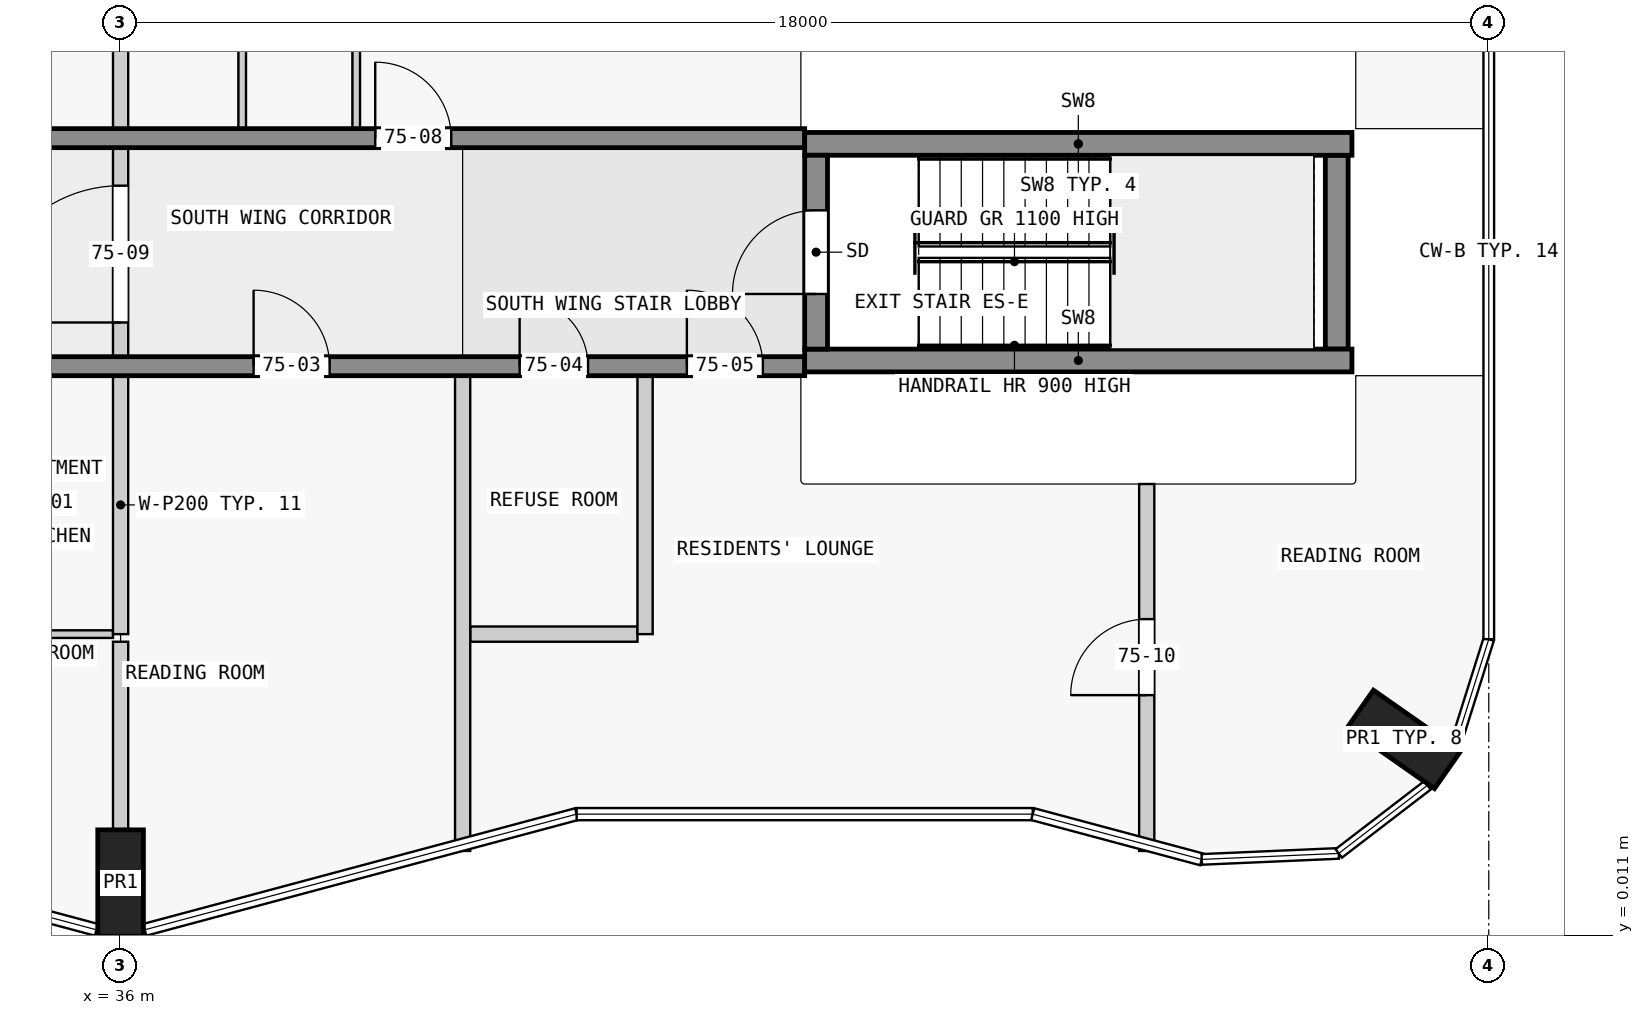
"""IFC4 building model, lengths in metres.
Left out: names, types, materials, properties, quantities, classifications, styles, units other than length and angle.
Written with IfcOpenShell. Run it as: python <this file> out.ifc"""

import sys

from ifc_helpers import new_model, si_unit, direction, frame, frame_2d, origin, origin_2d, place, context, subcontext, project, spatial, rectangle, extrude, element, fill, save


model = new_model("IFC4")
c1 = context("Model", 3, precision=1e-05, world=origin(), true_north=direction((0.0, 1.0)))
c2 = subcontext(c1, "Body", "Model", "MODEL_VIEW")
j1 = project(units=[si_unit("LENGTHUNIT", "METRE"), si_unit("PLANEANGLEUNIT", "RADIAN")], contexts=[c1])
p1 = place(None, origin())
s1 = spatial("IfcSite", under=j1, at=p1, CompositionType="ELEMENT")
p2 = place(p1, origin())
s2 = spatial("IfcBuilding", under=s1, at=p2, CompositionType="ELEMENT")
p3 = place(p2, frame((0.0, 0.0, 284.4)))
s3 = spatial("IfcBuildingStorey", under=s2, at=p3, CompositionType="ELEMENT", Elevation=284.4)
for number, where, z_axis, x_axis in (
    (1, (36.0, 0.7, 0.0), (0.0, 0.0, 1.0), (1.0, 0.0, 0.0)),
    (2, (52.884, 2.59, 0.0), (0.0, 0.0, 1.0), (0.574, 0.819, 0.0)),
):
    element("IfcColumn", number, at=place(p3, frame(where, z_axis=z_axis, x_axis=x_axis)), inside=s3, PredefinedType="COLUMN", context=c2, shape_type="SweptSolid", body=[
        extrude(rectangle(XDim=0.6, YDim=1.4, at=origin_2d()), origin(), (0.0, 0.0, 1.0), 3.5),
    ])
p4 = place(p3, frame((45.15, 7.725, 0.0), z_axis=(0.0, 0.0, 1.0), x_axis=(0.0, 1.0, 0.0)))
e3 = element("IfcWall", 3, at=p4, inside=s3, PredefinedType="SHEAR", context=c2, shape_type="SweptSolid", body=[
    extrude(rectangle(XDim=2.55, YDim=0.3, at=frame_2d((1.275, 0.0))), origin(), (0.0, 0.0, 1.0), 3.5),
])
p5 = place(p4, frame((0.725, 0.0, 0.0)))
e4 = element("IfcOpeningElement", 4, at=p5, cuts=e3, PredefinedType="OPENING", context=c2, shape_type="SweptSolid", body=[
    extrude(rectangle(XDim=1.1, YDim=2.1, at=frame_2d((0.55, 1.05))), frame((0.0, 0.16, 0.0), z_axis=(0.0, -1.0, 0.0), x_axis=(1.0, 0.0, 0.0)), (0.0, 0.0, 1.0), 0.32),
])
p6 = place(p3, frame((52.0, 7.725, 0.0), z_axis=(0.0, 0.0, 1.0), x_axis=(0.0, 1.0, 0.0)))
e5 = element("IfcWall", 5, at=p6, inside=s3, PredefinedType="SHEAR", context=c2, shape_type="SweptSolid", body=[
    extrude(rectangle(XDim=2.55, YDim=0.3, at=frame_2d((1.275, 0.0))), origin(), (0.0, 0.0, 1.0), 3.5),
])
for number, where, z_axis, x_axis in (
    (6, (45.0, 7.575, 0.0), (0.0, 0.0, 1.0), (1.0, 0.0, 0.0)),
    (7, (45.0, 10.425, 0.0), (0.0, 0.0, 1.0), (1.0, 0.0, 0.0)),
):
    element("IfcWall", number, at=place(p3, frame(where, z_axis=z_axis, x_axis=x_axis)), inside=s3, PredefinedType="SHEAR", context=c2, shape_type="SweptSolid", body=[
        extrude(rectangle(XDim=7.2, YDim=0.3, at=frame_2d((3.6, 0.0))), origin(), (0.0, 0.0, 1.0), 3.5),
    ])
p7 = place(p3, frame((22.5, 7.5, 0.0), z_axis=(0.0, 0.0, 1.0), x_axis=(1.0, 0.0, 0.0)))
e8 = element("IfcWall", 8, at=p7, inside=s3, PredefinedType="SHEAR", context=c2, shape_type="SweptSolid", body=[
    extrude(rectangle(XDim=22.5, YDim=0.25, at=frame_2d((11.25, 0.0))), origin(), (0.0, 0.0, 1.0), 3.05),
])
p8 = place(p7, frame((1.75, 0.0, 0.0)))
e9 = element("IfcOpeningElement", 9, at=p8, cuts=e8, PredefinedType="OPENING", context=c2, shape_type="SweptSolid", body=[
    extrude(rectangle(XDim=1.0, YDim=2.1, at=frame_2d((0.5, 1.05))), frame((0.0, 0.135, 0.0), z_axis=(0.0, -1.0, 0.0), x_axis=(1.0, 0.0, 0.0)), (0.0, 0.0, 1.0), 0.27),
])
p9 = place(p7, frame((8.55, 0.0, 0.0)))
e10 = element("IfcOpeningElement", 10, at=p9, cuts=e8, PredefinedType="OPENING", context=c2, shape_type="SweptSolid", body=[
    extrude(rectangle(XDim=1.0, YDim=2.1, at=frame_2d((0.5, 1.05))), frame((0.0, 0.135, 0.0), z_axis=(0.0, -1.0, 0.0), x_axis=(1.0, 0.0, 0.0)), (0.0, 0.0, 1.0), 0.27),
])
p10 = place(p7, frame((15.25, 0.0, 0.0)))
e11 = element("IfcOpeningElement", 11, at=p10, cuts=e8, PredefinedType="OPENING", context=c2, shape_type="SweptSolid", body=[
    extrude(rectangle(XDim=1.0, YDim=2.1, at=frame_2d((0.5, 1.05))), frame((0.0, 0.135, 0.0), z_axis=(0.0, -1.0, 0.0), x_axis=(1.0, 0.0, 0.0)), (0.0, 0.0, 1.0), 0.27),
])
p11 = place(p7, frame((18.75, 0.0, 0.0)))
e12 = element("IfcOpeningElement", 12, at=p11, cuts=e8, PredefinedType="OPENING", context=c2, shape_type="SweptSolid", body=[
    extrude(rectangle(XDim=0.9, YDim=2.1, at=frame_2d((0.45, 1.05))), frame((0.0, 0.135, 0.0), z_axis=(0.0, -1.0, 0.0), x_axis=(1.0, 0.0, 0.0)), (0.0, 0.0, 1.0), 0.27),
])
p12 = place(p7, frame((20.95, 0.0, 0.0)))
e13 = element("IfcOpeningElement", 13, at=p12, cuts=e8, PredefinedType="OPENING", context=c2, shape_type="SweptSolid", body=[
    extrude(rectangle(XDim=1.0, YDim=2.1, at=frame_2d((0.5, 1.05))), frame((0.0, 0.135, 0.0), z_axis=(0.0, -1.0, 0.0), x_axis=(1.0, 0.0, 0.0)), (0.0, 0.0, 1.0), 0.27),
])
p13 = place(p3, frame((22.5, 10.5, 0.0), z_axis=(0.0, 0.0, 1.0), x_axis=(1.0, 0.0, 0.0)))
e14 = element("IfcWall", 14, at=p13, inside=s3, PredefinedType="SHEAR", context=c2, shape_type="SweptSolid", body=[
    extrude(rectangle(XDim=22.5, YDim=0.25, at=frame_2d((11.25, 0.0))), origin(), (0.0, 0.0, 1.0), 3.05),
])
p14 = place(p13, frame((4.05, 0.0, 0.0)))
e15 = element("IfcOpeningElement", 15, at=p14, cuts=e14, PredefinedType="OPENING", context=c2, shape_type="SweptSolid", body=[
    extrude(rectangle(XDim=1.0, YDim=2.1, at=frame_2d((0.5, 1.05))), frame((0.0, 0.135, 0.0), z_axis=(0.0, -1.0, 0.0), x_axis=(1.0, 0.0, 0.0)), (0.0, 0.0, 1.0), 0.27),
])
p15 = place(p13, frame((10.35, 0.0, 0.0)))
e16 = element("IfcOpeningElement", 16, at=p15, cuts=e14, PredefinedType="OPENING", context=c2, shape_type="SweptSolid", body=[
    extrude(rectangle(XDim=1.8, YDim=2.1, at=frame_2d((0.9, 1.05))), frame((0.0, 0.135, 0.0), z_axis=(0.0, -1.0, 0.0), x_axis=(1.0, 0.0, 0.0)), (0.0, 0.0, 1.0), 0.27),
])
p16 = place(p13, frame((16.85, 0.0, 0.0)))
e17 = element("IfcOpeningElement", 17, at=p16, cuts=e14, PredefinedType="OPENING", context=c2, shape_type="SweptSolid", body=[
    extrude(rectangle(XDim=1.0, YDim=2.1, at=frame_2d((0.5, 1.05))), frame((0.0, 0.135, 0.0), z_axis=(0.0, -1.0, 0.0), x_axis=(1.0, 0.0, 0.0)), (0.0, 0.0, 1.0), 0.27),
])
p17 = place(p3, frame((34.25, 3.975, 0.0), z_axis=(0.0, 0.0, 1.0), x_axis=(1.0, 0.0, 0.0)))
e18 = element("IfcWall", 18, at=p17, inside=s3, PredefinedType="PARTITIONING", context=c2, shape_type="SweptSolid", body=[
    extrude(rectangle(XDim=1.65, YDim=0.1, at=frame_2d((0.825, 0.0))), origin(), (0.0, 0.0, 1.0), 3.05),
])
p18 = place(p3, frame((40.6, 3.975, 0.0), z_axis=(0.0, 0.0, 1.0), x_axis=(1.0, 0.0, 0.0)))
e19 = element("IfcWall", 19, at=p18, inside=s3, PredefinedType="PARTITIONING", context=c2, shape_type="SweptSolid", body=[
    extrude(rectangle(XDim=2.2, YDim=0.2, at=frame_2d((1.1, 0.0))), origin(), (0.0, 0.0, 1.0), 3.05),
])
p19 = place(p3, frame((36.0, 3.875, 0.0), z_axis=(0.0, 0.0, 1.0), x_axis=(0.0, -1.0, 0.0)))
e20 = element("IfcWall", 20, at=p19, inside=s3, PredefinedType="PARTITIONING", context=c2, shape_type="SweptSolid", body=[
    extrude(rectangle(XDim=2.475, YDim=0.2, at=frame_2d((1.238, 0.0))), origin(), (0.0, 0.0, 1.0), 3.05),
])
p20 = place(p3, frame((36.0, 3.975, 0.0), z_axis=(0.0, 0.0, 1.0), x_axis=(0.0, 1.0, 0.0)))
e21 = element("IfcWall", 21, at=p20, inside=s3, PredefinedType="PARTITIONING", context=c2, shape_type="SweptSolid", body=[
    extrude(rectangle(XDim=3.4, YDim=0.2, at=frame_2d((1.7, 0.0))), origin(), (0.0, 0.0, 1.0), 3.05),
])
p21 = place(p3, frame((36.0, 10.625, 0.0), z_axis=(0.0, 0.0, 1.0), x_axis=(0.0, 1.0, 0.0)))
e22 = element("IfcWall", 22, at=p21, inside=s3, PredefinedType="PARTITIONING", context=c2, shape_type="SweptSolid", body=[
    extrude(rectangle(XDim=5.975, YDim=0.2, at=frame_2d((2.988, 0.0))), origin(), (0.0, 0.0, 1.0), 3.05),
])
p22 = place(p3, frame((37.6, 10.625, 0.0), z_axis=(0.0, 0.0, 1.0), x_axis=(0.0, 1.0, 0.0)))
e23 = element("IfcWall", 23, at=p22, inside=s3, PredefinedType="PARTITIONING", context=c2, shape_type="SweptSolid", body=[
    extrude(rectangle(XDim=3.4, YDim=0.1, at=frame_2d((1.7, 0.0))), origin(), (0.0, 0.0, 1.0), 3.05),
])
p23 = place(p3, frame((39.1, 10.625, 0.0), z_axis=(0.0, 0.0, 1.0), x_axis=(0.0, 1.0, 0.0)))
e24 = element("IfcWall", 24, at=p23, inside=s3, PredefinedType="PARTITIONING", context=c2, shape_type="SweptSolid", body=[
    extrude(rectangle(XDim=3.4, YDim=0.1, at=frame_2d((1.7, 0.0))), origin(), (0.0, 0.0, 1.0), 3.05),
])
p24 = place(p23, frame((1.25, 0.0, 0.0)))
e25 = element("IfcOpeningElement", 25, at=p24, cuts=e24, PredefinedType="OPENING", context=c2, shape_type="SweptSolid", body=[
    extrude(rectangle(XDim=0.9, YDim=2.1, at=frame_2d((0.45, 1.05))), frame((0.0, 0.06, 0.0), z_axis=(0.0, -1.0, 0.0), x_axis=(1.0, 0.0, 0.0)), (0.0, 0.0, 1.0), 0.12),
])
p25 = place(p3, frame((40.5, 1.122, 0.0), z_axis=(0.0, 0.0, 1.0), x_axis=(0.0, 1.0, 0.0)))
e26 = element("IfcWall", 26, at=p25, inside=s3, PredefinedType="PARTITIONING", context=c2, shape_type="SweptSolid", body=[
    extrude(rectangle(XDim=6.253, YDim=0.2, at=frame_2d((3.126, 0.0))), origin(), (0.0, 0.0, 1.0), 3.05),
])
p26 = place(p3, frame((42.9, 3.975, 0.0), z_axis=(0.0, 0.0, 1.0), x_axis=(0.0, 1.0, 0.0)))
e27 = element("IfcWall", 27, at=p26, inside=s3, PredefinedType="PARTITIONING", context=c2, shape_type="SweptSolid", body=[
    extrude(rectangle(XDim=3.4, YDim=0.2, at=frame_2d((1.7, 0.0))), origin(), (0.0, 0.0, 1.0), 3.05),
])
p27 = place(p3, frame((49.5, 1.122, 0.0), z_axis=(0.0, 0.0, 1.0), x_axis=(0.0, 1.0, 0.0)))
e28 = element("IfcWall", 28, at=p27, inside=s3, PredefinedType="PARTITIONING", context=c2, shape_type="SweptSolid", body=[
    extrude(rectangle(XDim=4.828, YDim=0.2, at=frame_2d((2.414, 0.0))), origin(), (0.0, 0.0, 1.0), 3.05),
])
p28 = place(p27, frame((2.05, 0.0, 0.0)))
e29 = element("IfcOpeningElement", 29, at=p28, cuts=e28, PredefinedType="OPENING", context=c2, shape_type="SweptSolid", body=[
    extrude(rectangle(XDim=1.0, YDim=2.1, at=frame_2d((0.5, 1.05))), frame((0.0, 0.11, 0.0), z_axis=(0.0, -1.0, 0.0), x_axis=(1.0, 0.0, 0.0)), (0.0, 0.0, 1.0), 0.22),
])
p29 = place(p3, frame((36.0, 7.475, 0.0), z_axis=(0.0, 0.0, 1.0), x_axis=(0.0, 1.0, 0.0)))
e30 = element("IfcWall", 30, at=p29, inside=s3, PredefinedType="PARTITIONING", context=c2, shape_type="SweptSolid", body=[
    extrude(rectangle(XDim=3.05, YDim=0.2, at=frame_2d((1.525, 0.0))), origin(), (0.0, 0.0, 1.0), 3.05),
])
p30 = place(p29, frame((0.6, 0.0, 0.0)))
e31 = element("IfcOpeningElement", 31, at=p30, cuts=e30, PredefinedType="OPENING", context=c2, shape_type="SweptSolid", body=[
    extrude(rectangle(XDim=1.8, YDim=2.1, at=frame_2d((0.9, 1.05))), frame((0.0, 0.11, 0.0), z_axis=(0.0, -1.0, 0.0), x_axis=(1.0, 0.0, 0.0)), (0.0, 0.0, 1.0), 0.22),
])
p31 = place(p5, origin())
e32 = element("IfcDoor", 32, at=p31, inside=s3, OperationType="SINGLE_SWING_LEFT", PredefinedType="DOOR", context=c2, shape_type="SweptSolid", body=[
    extrude(rectangle(XDim=1.1, YDim=2.1, at=frame_2d((0.55, 1.05))), frame((0.0, 0.025, 0.0), z_axis=(0.0, -1.0, 0.0), x_axis=(1.0, 0.0, 0.0)), (0.0, 0.0, 1.0), 0.05),
])
fill(e4, e32)
p32 = place(p10, origin())
e33 = element("IfcDoor", 33, at=p32, inside=s3, OperationType="SINGLE_SWING_RIGHT", PredefinedType="DOOR", context=c2, shape_type="SweptSolid", body=[
    extrude(rectangle(XDim=1.0, YDim=2.1, at=frame_2d((0.5, 1.05))), frame((0.0, 0.025, 0.0), z_axis=(0.0, -1.0, 0.0), x_axis=(1.0, 0.0, 0.0)), (0.0, 0.0, 1.0), 0.05),
])
fill(e11, e33)
p33 = place(p11, origin())
e34 = element("IfcDoor", 34, at=p33, inside=s3, OperationType="SINGLE_SWING_RIGHT", PredefinedType="DOOR", context=c2, shape_type="SweptSolid", body=[
    extrude(rectangle(XDim=0.9, YDim=2.1, at=frame_2d((0.45, 1.05))), frame((0.0, 0.025, 0.0), z_axis=(0.0, -1.0, 0.0), x_axis=(1.0, 0.0, 0.0)), (0.0, 0.0, 1.0), 0.05),
])
fill(e12, e34)
p34 = place(p12, origin())
e35 = element("IfcDoor", 35, at=p34, inside=s3, OperationType="SINGLE_SWING_RIGHT", PredefinedType="DOOR", context=c2, shape_type="SweptSolid", body=[
    extrude(rectangle(XDim=1.0, YDim=2.1, at=frame_2d((0.5, 1.05))), frame((0.0, 0.025, 0.0), z_axis=(0.0, -1.0, 0.0), x_axis=(1.0, 0.0, 0.0)), (0.0, 0.0, 1.0), 0.05),
])
fill(e13, e35)
p35 = place(p16, origin())
e36 = element("IfcDoor", 36, at=p35, inside=s3, OperationType="SINGLE_SWING_RIGHT", PredefinedType="DOOR", context=c2, shape_type="SweptSolid", body=[
    extrude(rectangle(XDim=1.0, YDim=2.1, at=frame_2d((0.5, 1.05))), frame((0.0, 0.025, 0.0), z_axis=(0.0, -1.0, 0.0), x_axis=(1.0, 0.0, 0.0)), (0.0, 0.0, 1.0), 0.05),
])
fill(e17, e36)
p36 = place(p30, origin())
e37 = element("IfcDoor", 37, at=p36, inside=s3, OperationType="SINGLE_SWING_LEFT", PredefinedType="DOOR", context=c2, shape_type="SweptSolid", body=[
    extrude(rectangle(XDim=1.8, YDim=2.1, at=frame_2d((0.9, 1.05))), frame((0.0, 0.025, 0.0), z_axis=(0.0, -1.0, 0.0), x_axis=(1.0, 0.0, 0.0)), (0.0, 0.0, 1.0), 0.05),
])
fill(e31, e37)
p37 = place(p28, origin())
e38 = element("IfcDoor", 38, at=p37, inside=s3, OperationType="SINGLE_SWING_RIGHT", PredefinedType="DOOR", context=c2, shape_type="SweptSolid", body=[
    extrude(rectangle(XDim=1.0, YDim=2.1, at=frame_2d((0.5, 1.05))), frame((0.0, 0.025, 0.0), z_axis=(0.0, -1.0, 0.0), x_axis=(1.0, 0.0, 0.0)), (0.0, 0.0, 1.0), 0.05),
])
fill(e29, e38)
save(model, sys.argv[1])
